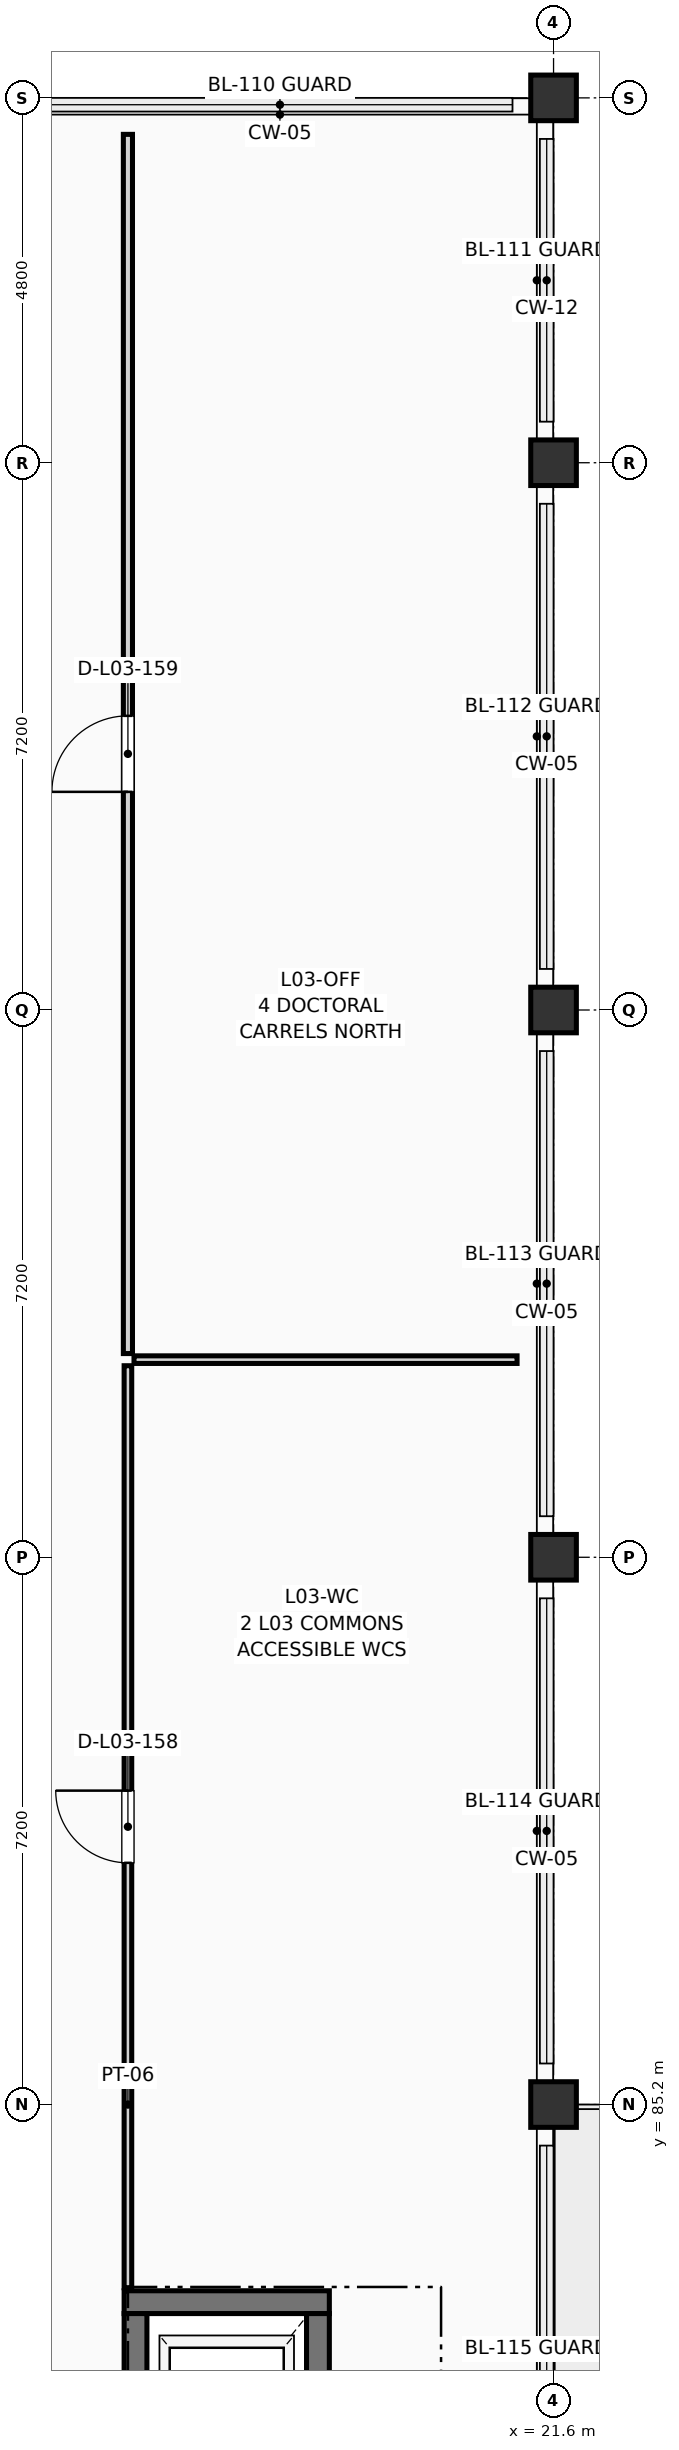
"""IFC4 building model, lengths in metres.
Left out: names, types, materials, properties, quantities, classifications, styles, units other than length and angle.
Written with IfcOpenShell. Run it as: python <this file> out.ifc"""

import sys

from ifc_helpers import new_model, si_unit, direction, frame, frame_2d, origin, origin_2d, place, context, subcontext, project, spatial, rectangle, extrude, element, fill, save


model = new_model("IFC4")
c1 = context("Model", 3, precision=1e-05, world=origin(), true_north=direction((0.0, 1.0)))
c2 = subcontext(c1, "Body", "Model", "MODEL_VIEW")
j1 = project(units=[si_unit("LENGTHUNIT", "METRE"), si_unit("PLANEANGLEUNIT", "RADIAN")], contexts=[c1])
p1 = place(None, origin())
s1 = spatial("IfcSite", under=j1, at=p1, CompositionType="ELEMENT")
p2 = place(p1, origin())
s2 = spatial("IfcBuilding", under=s1, at=p2, CompositionType="ELEMENT")
p3 = place(p2, frame((0.0, 0.0, 12.15)))
s3 = spatial("IfcBuildingStorey", under=s2, at=p3, CompositionType="ELEMENT", Elevation=12.15)
for number, where, z_axis, x_axis in (
    (1, (21.6, 85.2, 0.0), (0.0, 0.0, 1.0), (1.0, 0.0, 0.0)),
    (2, (21.6, 92.4, 0.0), (0.0, 0.0, 1.0), (1.0, 0.0, 0.0)),
    (3, (21.6, 99.6, 0.0), (0.0, 0.0, 1.0), (1.0, 0.0, 0.0)),
    (4, (21.6, 106.8, 0.0), (0.0, 0.0, 1.0), (1.0, 0.0, 0.0)),
    (5, (21.6, 111.6, 0.0), (0.0, 0.0, 1.0), (1.0, 0.0, 0.0)),
):
    element("IfcColumn", number, at=place(p3, frame(where, z_axis=z_axis, x_axis=x_axis)), inside=s3, PredefinedType="COLUMN", context=c2, shape_type="SweptSolid", body=[
        extrude(rectangle(XDim=0.6, YDim=0.6, at=origin_2d()), origin(), (0.0, 0.0, 1.0), 3.6),
    ])
p4 = place(p3, frame((15.95, 82.6, 0.0), z_axis=(0.0, 0.0, 1.0), x_axis=(1.0, 0.0, 0.0)))
e6 = element("IfcWall", 6, at=p4, inside=s3, PredefinedType="SHEAR", context=c2, shape_type="SweptSolid", body=[
    extrude(rectangle(XDim=2.7, YDim=0.3, at=frame_2d((1.35, 0.0))), origin(), (0.0, 0.0, 1.0), 3.39),
])
p5 = place(p3, frame((16.1, 79.78, 0.0), z_axis=(0.0, 0.0, 1.0), x_axis=(0.0, 1.0, 0.0)))
e7 = element("IfcWall", 7, at=p5, inside=s3, PredefinedType="SHEAR", context=c2, shape_type="SweptSolid", body=[
    extrude(rectangle(XDim=2.67, YDim=0.3, at=frame_2d((1.335, 0.0))), origin(), (0.0, 0.0, 1.0), 3.39),
])
p6 = place(p5, frame((0.785, 0.0, 0.0)))
e8 = element("IfcOpeningElement", 8, at=p6, cuts=e7, PredefinedType="OPENING", context=c2, shape_type="SweptSolid", body=[
    extrude(rectangle(XDim=1.1, YDim=2.2, at=frame_2d((0.55, 1.1))), frame((0.0, 0.162, 0.0), z_axis=(0.0, -1.0, 0.0), x_axis=(1.0, 0.0, 0.0)), (0.0, 0.0, 1.0), 0.324),
])
p7 = place(p3, frame((18.5, 79.78, 0.0), z_axis=(0.0, 0.0, 1.0), x_axis=(0.0, 1.0, 0.0)))
e9 = element("IfcWall", 9, at=p7, inside=s3, PredefinedType="SHEAR", context=c2, shape_type="SweptSolid", body=[
    extrude(rectangle(XDim=2.67, YDim=0.3, at=frame_2d((1.335, 0.0))), origin(), (0.0, 0.0, 1.0), 3.39),
])
p8 = place(p3, frame((16.0, 82.79, 0.0), z_axis=(0.0, 0.0, 1.0), x_axis=(0.0, 1.0, 0.0)))
e10 = element("IfcWall", 10, at=p8, inside=s3, PredefinedType="PARTITIONING", context=c2, shape_type="SweptSolid", body=[
    extrude(rectangle(XDim=12.13, YDim=0.1, at=frame_2d((6.065, 0.0))), origin(), (0.0, 0.0, 1.0), 3.375),
])
p9 = place(p8, frame((5.59, 0.0, 0.0)))
e11 = element("IfcOpeningElement", 11, at=p9, cuts=e10, PredefinedType="OPENING", context=c2, shape_type="SweptSolid", body=[
    extrude(rectangle(XDim=0.95, YDim=2.1, at=frame_2d((0.475, 1.05))), frame((0.0, 0.062, 0.0), z_axis=(0.0, -1.0, 0.0), x_axis=(1.0, 0.0, 0.0)), (0.0, 0.0, 1.0), 0.124),
])
p10 = place(p3, frame((16.08, 95.0, 0.0), z_axis=(0.0, 0.0, 1.0), x_axis=(1.0, 0.0, 0.0)))
e12 = element("IfcWall", 12, at=p10, inside=s3, PredefinedType="PARTITIONING", context=c2, shape_type="SweptSolid", body=[
    extrude(rectangle(XDim=5.04, YDim=0.1, at=frame_2d((2.52, 0.0))), origin(), (0.0, 0.0, 1.0), 3.375),
])
p11 = place(p3, frame((16.0, 95.08, 0.0), z_axis=(0.0, 0.0, 1.0), x_axis=(0.0, 1.0, 0.0)))
e13 = element("IfcWall", 13, at=p11, inside=s3, PredefinedType="PARTITIONING", context=c2, shape_type="SweptSolid", body=[
    extrude(rectangle(XDim=16.04, YDim=0.12, at=frame_2d((8.02, 0.0))), origin(), (0.0, 0.0, 1.0), 3.375),
])
p12 = place(p11, frame((7.39, 0.0, 0.0)))
e14 = element("IfcOpeningElement", 14, at=p12, cuts=e13, PredefinedType="OPENING", context=c2, shape_type="SweptSolid", body=[
    extrude(rectangle(XDim=1.0, YDim=2.15, at=frame_2d((0.5, 1.075))), frame((0.0, 0.072, 0.0), z_axis=(0.0, -1.0, 0.0), x_axis=(1.0, 0.0, 0.0)), (0.0, 0.0, 1.0), 0.144),
])
p13 = place(p9, origin())
e15 = element("IfcDoor", 15, at=p13, inside=s3, OperationType="SINGLE_SWING_RIGHT", PredefinedType="DOOR", context=c2, shape_type="SweptSolid", body=[
    extrude(rectangle(XDim=0.95, YDim=2.1, at=frame_2d((0.475, 1.05))), frame((0.0, 0.025, 0.0), z_axis=(0.0, -1.0, 0.0), x_axis=(1.0, 0.0, 0.0)), (0.0, 0.0, 1.0), 0.05),
])
fill(e11, e15)
p14 = place(p12, origin())
e16 = element("IfcDoor", 16, at=p14, inside=s3, OperationType="SINGLE_SWING_LEFT", PredefinedType="DOOR", context=c2, shape_type="SweptSolid", body=[
    extrude(rectangle(XDim=1.0, YDim=2.15, at=frame_2d((0.5, 1.075))), frame((0.0, 0.025, 0.0), z_axis=(0.0, -1.0, 0.0), x_axis=(1.0, 0.0, 0.0)), (0.0, 0.0, 1.0), 0.05),
])
fill(e14, e16)
save(model, sys.argv[1])
